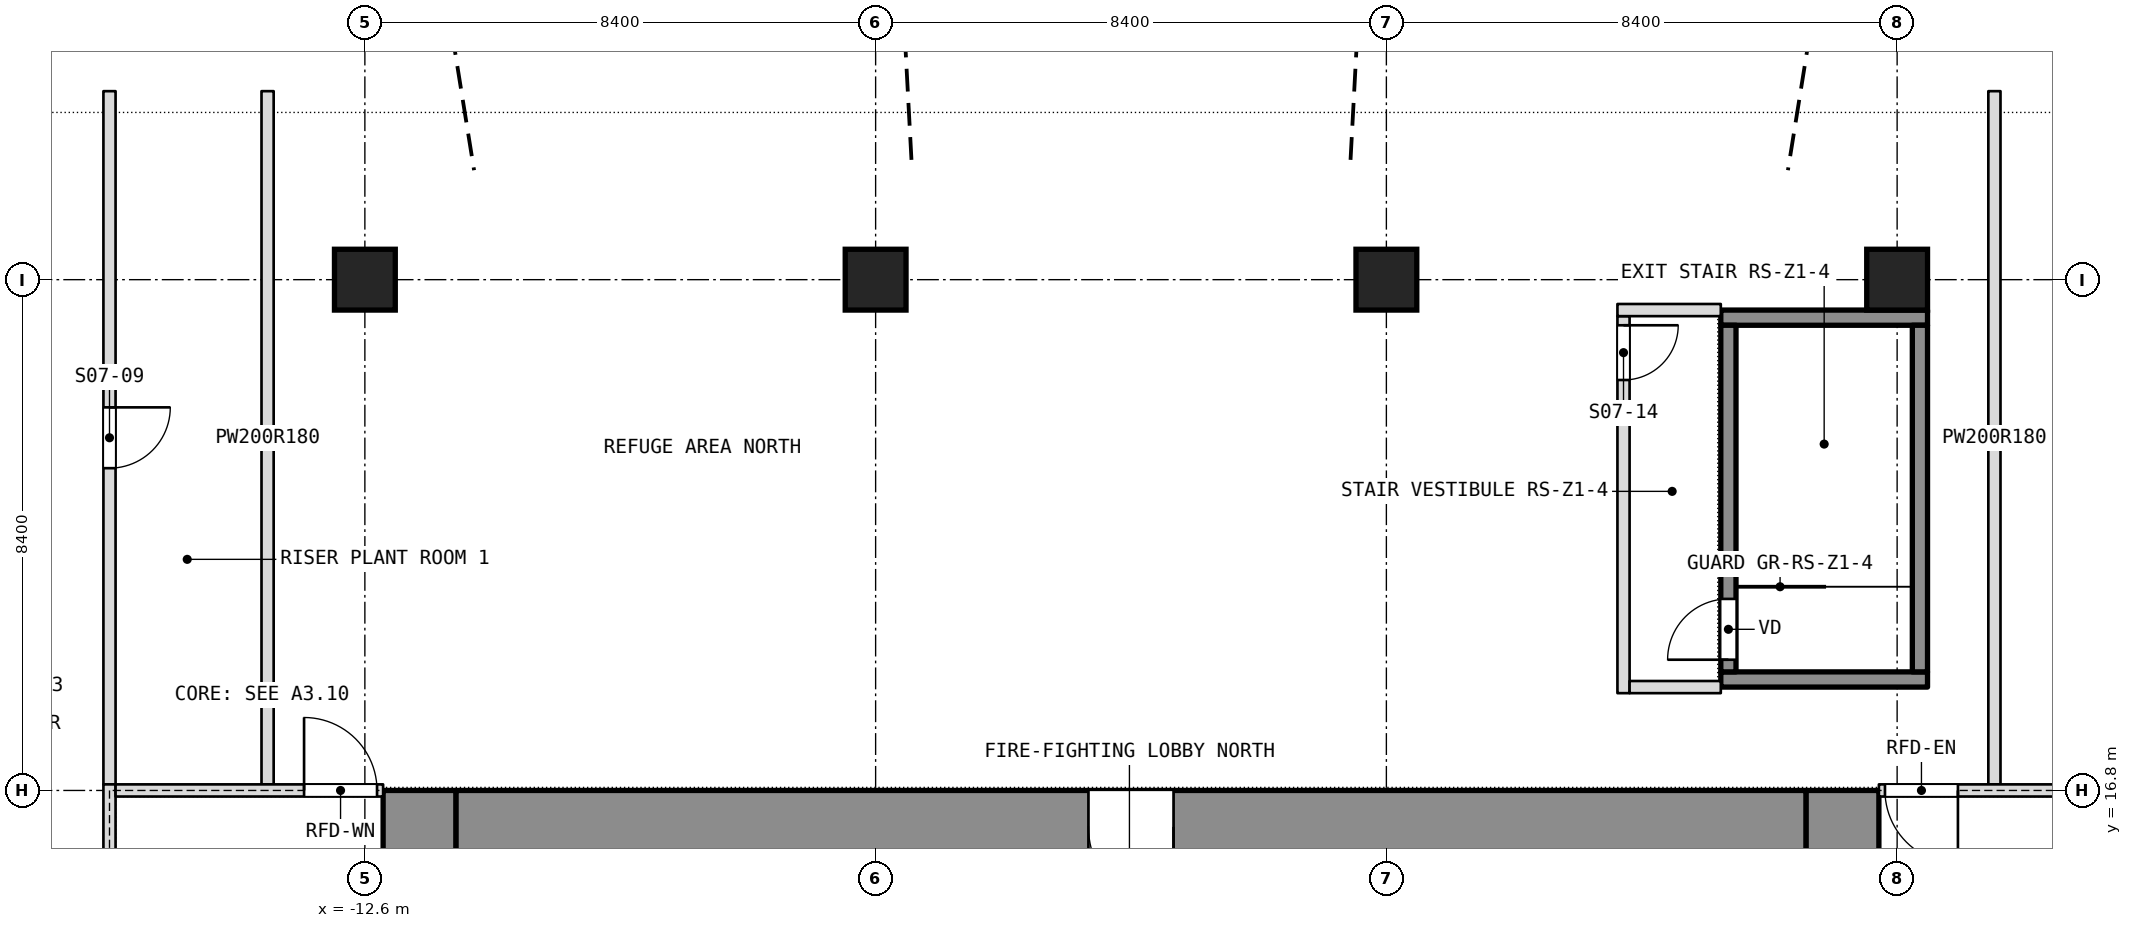
"""IFC4 building model, lengths in metres.
Left out: names, types, materials, properties, quantities, classifications, styles, units other than length and angle.
Written with IfcOpenShell. Run it as: python <this file> out.ifc"""

import sys

from ifc_helpers import new_model, si_unit, direction, frame, frame_2d, origin, origin_2d, place, context, subcontext, project, spatial, rectangle, extrude, element, fill, save


model = new_model("IFC4")
c1 = context("Model", 3, precision=1e-05, world=origin(), true_north=direction((0.0, 1.0)))
c2 = subcontext(c1, "Body", "Model", "MODEL_VIEW")
j1 = project(units=[si_unit("LENGTHUNIT", "METRE"), si_unit("PLANEANGLEUNIT", "RADIAN")], contexts=[c1])
p1 = place(None, origin())
s1 = spatial("IfcSite", under=j1, at=p1, CompositionType="ELEMENT")
p2 = place(p1, origin())
s2 = spatial("IfcBuilding", under=s1, at=p2, CompositionType="ELEMENT")
p3 = place(p2, frame((0.0, 0.0, 86.9)))
s3 = spatial("IfcBuildingStorey", under=s2, at=p3, CompositionType="ELEMENT", Elevation=86.9)
p4 = place(p3, frame((11.7, 0.0, 0.0), z_axis=(0.0, 0.0, 1.0), x_axis=(0.0, 1.0, 0.0)))
e1 = element("IfcWall", 1, at=p4, inside=s3, PredefinedType="SHEAR", context=c2, shape_type="SweptSolid", body=[
    extrude(rectangle(XDim=16.8, YDim=1.2, at=frame_2d((8.4, 0.0))), origin(), (0.0, 0.0, 1.0), 10.8),
])
p5 = place(p4, frame((6.825, 0.0, 0.0)))
e2 = element("IfcOpeningElement", 2, at=p5, cuts=e1, PredefinedType="OPENING", context=c2, shape_type="SweptSolid", body=[
    extrude(rectangle(XDim=1.2, YDim=2.1, at=frame_2d((0.6, 1.05))), frame((0.0, 0.6, 0.0), z_axis=(0.0, -1.0, 0.0), x_axis=(1.0, 0.0, 0.0)), (0.0, 0.0, 1.0), 1.2),
])
p6 = place(p4, frame((8.775, 0.0, 0.0)))
e3 = element("IfcOpeningElement", 3, at=p6, cuts=e1, PredefinedType="OPENING", context=c2, shape_type="SweptSolid", body=[
    extrude(rectangle(XDim=1.2, YDim=2.1, at=frame_2d((0.6, 1.05))), frame((0.0, 0.6, 0.0), z_axis=(0.0, -1.0, 0.0), x_axis=(1.0, 0.0, 0.0)), (0.0, 0.0, 1.0), 1.2),
])
p7 = place(p3, frame((-11.7, 0.0, 0.0), z_axis=(0.0, 0.0, 1.0), x_axis=(0.0, 1.0, 0.0)))
e4 = element("IfcWall", 4, at=p7, inside=s3, PredefinedType="SHEAR", context=c2, shape_type="SweptSolid", body=[
    extrude(rectangle(XDim=16.8, YDim=1.2, at=frame_2d((8.4, 0.0))), origin(), (0.0, 0.0, 1.0), 10.8),
])
p8 = place(p7, frame((6.825, 0.0, 0.0)))
e5 = element("IfcOpeningElement", 5, at=p8, cuts=e4, PredefinedType="OPENING", context=c2, shape_type="SweptSolid", body=[
    extrude(rectangle(XDim=1.2, YDim=2.1, at=frame_2d((0.6, 1.05))), frame((0.0, 0.6, 0.0), z_axis=(0.0, -1.0, 0.0), x_axis=(1.0, 0.0, 0.0)), (0.0, 0.0, 1.0), 1.2),
])
p9 = place(p7, frame((8.775, 0.0, 0.0)))
e6 = element("IfcOpeningElement", 6, at=p9, cuts=e4, PredefinedType="OPENING", context=c2, shape_type="SweptSolid", body=[
    extrude(rectangle(XDim=1.2, YDim=2.1, at=frame_2d((0.6, 1.05))), frame((0.0, 0.6, 0.0), z_axis=(0.0, -1.0, 0.0), x_axis=(1.0, 0.0, 0.0)), (0.0, 0.0, 1.0), 1.2),
])
p10 = place(p3, frame((-11.1, 16.2, 0.0), z_axis=(0.0, 0.0, 1.0), x_axis=(1.0, 0.0, 0.0)))
e7 = element("IfcWall", 7, at=p10, inside=s3, PredefinedType="SHEAR", context=c2, shape_type="SweptSolid", body=[
    extrude(rectangle(XDim=22.2, YDim=1.2, at=frame_2d((11.1, 0.0))), origin(), (0.0, 0.0, 1.0), 10.8),
])
p11 = place(p10, frame((10.4, 0.0, 0.0)))
e8 = element("IfcOpeningElement", 8, at=p11, cuts=e7, PredefinedType="OPENING", context=c2, shape_type="SweptSolid", body=[
    extrude(rectangle(XDim=1.4, YDim=2.1, at=frame_2d((0.7, 1.05))), frame((0.0, 0.6, 0.0), z_axis=(0.0, -1.0, 0.0), x_axis=(1.0, 0.0, 0.0)), (0.0, 0.0, 1.0), 1.2),
])
for number, where, z_axis, x_axis in (
    (9, (-12.6, 25.2, 0.0), (0.0, 0.0, 1.0), (1.0, 0.0, 0.0)),
    (10, (-4.2, 25.2, 0.0), (0.0, 0.0, 1.0), (1.0, 0.0, 0.0)),
    (11, (4.2, 25.2, 0.0), (0.0, 0.0, 1.0), (1.0, 0.0, 0.0)),
    (12, (12.6, 25.2, 0.0), (0.0, 0.0, 1.0), (1.0, 0.0, 0.0)),
):
    element("IfcColumn", number, at=place(p3, frame(where, z_axis=z_axis, x_axis=x_axis)), inside=s3, PredefinedType="COLUMN", context=c2, shape_type="SweptSolid", body=[
        extrude(rectangle(XDim=1.0, YDim=1.0, at=origin_2d()), origin(), (0.0, 0.0, 1.0), 10.54),
    ])
p12 = place(p3, frame((14.2, 16.9, 0.0), z_axis=(0.0, 0.0, 1.0), x_axis=(0.0, 1.0, 0.0)))
e13 = element("IfcWall", 13, at=p12, inside=s3, PredefinedType="PARTITIONING", context=c2, shape_type="SweptSolid", body=[
    extrude(rectangle(XDim=11.4, YDim=0.2, at=frame_2d((5.7, 0.0))), origin(), (0.0, 0.0, 1.0), 10.54),
])
p13 = place(p3, frame((8.1, 18.4, 0.0), z_axis=(0.0, 0.0, 1.0), x_axis=(0.0, 1.0, 0.0)))
e14 = element("IfcWall", 14, at=p13, inside=s3, PredefinedType="PARTITIONING", context=c2, shape_type="SweptSolid", body=[
    extrude(rectangle(XDim=6.2, YDim=0.2, at=frame_2d((3.1, 0.0))), origin(), (0.0, 0.0, 1.0), 10.54),
])
p14 = place(p13, frame((5.15, 0.0, 0.0)))
e15 = element("IfcOpeningElement", 15, at=p14, cuts=e14, PredefinedType="OPENING", context=c2, shape_type="SweptSolid", body=[
    extrude(rectangle(XDim=0.9, YDim=2.1, at=frame_2d((0.45, 1.05))), frame((0.0, 0.1, 0.0), z_axis=(0.0, -1.0, 0.0), x_axis=(1.0, 0.0, 0.0)), (0.0, 0.0, 1.0), 0.2),
])
p15 = place(p3, frame((-14.2, 16.9, 0.0), z_axis=(0.0, 0.0, 1.0), x_axis=(0.0, 1.0, 0.0)))
e16 = element("IfcWall", 16, at=p15, inside=s3, PredefinedType="PARTITIONING", context=c2, shape_type="SweptSolid", body=[
    extrude(rectangle(XDim=11.4, YDim=0.2, at=frame_2d((5.7, 0.0))), origin(), (0.0, 0.0, 1.0), 10.54),
])
p16 = place(p3, frame((-16.8, 16.9, 0.0), z_axis=(0.0, 0.0, 1.0), x_axis=(0.0, 1.0, 0.0)))
e17 = element("IfcWall", 17, at=p16, inside=s3, PredefinedType="PARTITIONING", context=c2, shape_type="SweptSolid", body=[
    extrude(rectangle(XDim=11.4, YDim=0.2, at=frame_2d((5.7, 0.0))), origin(), (0.0, 0.0, 1.0), 10.14),
])
p17 = place(p16, frame((5.2, 0.0, 0.0)))
e18 = element("IfcOpeningElement", 18, at=p17, cuts=e17, PredefinedType="OPENING", context=c2, shape_type="SweptSolid", body=[
    extrude(rectangle(XDim=1.0, YDim=2.1, at=frame_2d((0.5, 1.05))), frame((0.0, 0.1, 0.0), z_axis=(0.0, -1.0, 0.0), x_axis=(1.0, 0.0, 0.0)), (0.0, 0.0, 1.0), 0.2),
])
p18 = place(p3, frame((8.2, 18.5, 0.0), z_axis=(0.0, 0.0, 1.0), x_axis=(1.0, 0.0, 0.0)))
e19 = element("IfcWall", 19, at=p18, inside=s3, PredefinedType="PARTITIONING", context=c2, shape_type="SweptSolid", body=[
    extrude(rectangle(XDim=1.5, YDim=0.2, at=frame_2d((0.75, 0.0))), origin(), (0.0, 0.0, 1.0), 10.54),
])
p19 = place(p3, frame((8.0, 24.7, 0.0), z_axis=(0.0, 0.0, 1.0), x_axis=(1.0, 0.0, 0.0)))
e20 = element("IfcWall", 20, at=p19, inside=s3, PredefinedType="PARTITIONING", context=c2, shape_type="SweptSolid", body=[
    extrude(rectangle(XDim=1.7, YDim=0.2, at=frame_2d((0.85, 0.0))), origin(), (0.0, 0.0, 1.0), 10.54),
])
p20 = place(p3, frame((-16.8, -0.1, 0.0), z_axis=(0.0, 0.0, 1.0), x_axis=(0.0, 1.0, 0.0)))
e21 = element("IfcWall", 21, at=p20, inside=s3, PredefinedType="PARTITIONING", context=c2, shape_type="SweptSolid", body=[
    extrude(rectangle(XDim=17.0, YDim=0.2, at=frame_2d((8.5, 0.0))), origin(), (0.0, 0.0, 1.0), 10.54),
])
p21 = place(p20, frame((2.2, 0.0, 0.0)))
e22 = element("IfcOpeningElement", 22, at=p21, cuts=e21, PredefinedType="OPENING", context=c2, shape_type="SweptSolid", body=[
    extrude(rectangle(XDim=1.8, YDim=2.1, at=frame_2d((0.9, 1.05))), frame((0.0, 0.1, 0.0), z_axis=(0.0, -1.0, 0.0), x_axis=(1.0, 0.0, 0.0)), (0.0, 0.0, 1.0), 0.2),
])
p22 = place(p20, frame((7.2, 0.0, 0.0)))
e23 = element("IfcOpeningElement", 23, at=p22, cuts=e21, PredefinedType="OPENING", context=c2, shape_type="SweptSolid", body=[
    extrude(rectangle(XDim=1.8, YDim=2.1, at=frame_2d((0.9, 1.05))), frame((0.0, 0.1, 0.0), z_axis=(0.0, -1.0, 0.0), x_axis=(1.0, 0.0, 0.0)), (0.0, 0.0, 1.0), 0.2),
])
p23 = place(p3, frame((-16.7, 16.8, 0.0), z_axis=(0.0, 0.0, 1.0), x_axis=(1.0, 0.0, 0.0)))
e24 = element("IfcWall", 24, at=p23, inside=s3, PredefinedType="PARTITIONING", context=c2, shape_type="SweptSolid", body=[
    extrude(rectangle(XDim=4.4, YDim=0.2, at=frame_2d((2.2, 0.0))), origin(), (0.0, 0.0, 1.0), 10.09),
])
p24 = place(p23, frame((3.1, 0.0, 0.0)))
e25 = element("IfcOpeningElement", 25, at=p24, cuts=e24, PredefinedType="OPENING", context=c2, shape_type="SweptSolid", body=[
    extrude(rectangle(XDim=1.2, YDim=2.1, at=frame_2d((0.6, 1.05))), frame((0.0, 0.1, 0.0), z_axis=(0.0, -1.0, 0.0), x_axis=(1.0, 0.0, 0.0)), (0.0, 0.0, 1.0), 0.2),
])
p25 = place(p3, frame((12.3, 16.8, 0.0), z_axis=(0.0, 0.0, 1.0), x_axis=(1.0, 0.0, 0.0)))
e26 = element("IfcWall", 26, at=p25, inside=s3, PredefinedType="PARTITIONING", context=c2, shape_type="SweptSolid", body=[
    extrude(rectangle(XDim=4.4, YDim=0.2, at=frame_2d((2.2, 0.0))), origin(), (0.0, 0.0, 1.0), 10.09),
])
p26 = place(p25, frame((0.1, 0.0, 0.0)))
e27 = element("IfcOpeningElement", 27, at=p26, cuts=e26, PredefinedType="OPENING", context=c2, shape_type="SweptSolid", body=[
    extrude(rectangle(XDim=1.2, YDim=2.1, at=frame_2d((0.6, 1.05))), frame((0.0, 0.1, 0.0), z_axis=(0.0, -1.0, 0.0), x_axis=(1.0, 0.0, 0.0)), (0.0, 0.0, 1.0), 0.2),
])
for number, where, z_axis, x_axis in (
    (28, (9.7, 18.625, 0.1), (0.0, 0.0, 1.0), (1.0, 0.0, 0.0)),
    (29, (9.7, 24.575, 0.1), (0.0, 0.0, 1.0), (1.0, 0.0, 0.0)),
):
    element("IfcWall", number, at=place(p3, frame(where, z_axis=z_axis, x_axis=x_axis)), inside=s3, PredefinedType="SHEAR", context=c2, shape_type="SweptSolid", body=[
        extrude(rectangle(XDim=3.4, YDim=0.25, at=frame_2d((1.7, 0.0))), origin(), (0.0, 0.0, 1.0), 10.44),
    ])
p27 = place(p3, frame((9.825, 18.75, 0.1), z_axis=(0.0, 0.0, 1.0), x_axis=(0.0, 1.0, 0.0)))
e30 = element("IfcWall", 30, at=p27, inside=s3, PredefinedType="SHEAR", context=c2, shape_type="SweptSolid", body=[
    extrude(rectangle(XDim=5.7, YDim=0.25, at=frame_2d((2.85, 0.0))), origin(), (0.0, 0.0, 1.0), 10.44),
])
p28 = place(p27, frame((0.2, 0.0, 0.0)))
e31 = element("IfcOpeningElement", 31, at=p28, cuts=e30, PredefinedType="OPENING", context=c2, shape_type="SweptSolid", body=[
    extrude(rectangle(XDim=1.0, YDim=2.1, at=frame_2d((0.5, 1.05))), frame((0.0, 0.125, 0.0), z_axis=(0.0, -1.0, 0.0), x_axis=(1.0, 0.0, 0.0)), (0.0, 0.0, 1.0), 0.25),
])
p29 = place(p3, frame((12.975, 18.75, 0.1), z_axis=(0.0, 0.0, 1.0), x_axis=(0.0, 1.0, 0.0)))
e32 = element("IfcWall", 32, at=p29, inside=s3, PredefinedType="SHEAR", context=c2, shape_type="SweptSolid", body=[
    extrude(rectangle(XDim=5.7, YDim=0.25, at=frame_2d((2.85, 0.0))), origin(), (0.0, 0.0, 1.0), 10.44),
])
p30 = place(p17, origin())
e33 = element("IfcDoor", 33, at=p30, inside=s3, OperationType="SINGLE_SWING_RIGHT", PredefinedType="DOOR", context=c2, shape_type="SweptSolid", body=[
    extrude(rectangle(XDim=1.0, YDim=2.1, at=frame_2d((0.5, 1.05))), frame((0.0, 0.025, 0.0), z_axis=(0.0, -1.0, 0.0), x_axis=(1.0, 0.0, 0.0)), (0.0, 0.0, 1.0), 0.05),
])
fill(e18, e33)
p31 = place(p14, origin())
e34 = element("IfcDoor", 34, at=p31, inside=s3, OperationType="SINGLE_SWING_LEFT", PredefinedType="DOOR", context=c2, shape_type="SweptSolid", body=[
    extrude(rectangle(XDim=0.9, YDim=2.1, at=frame_2d((0.45, 1.05))), frame((0.0, 0.025, 0.0), z_axis=(0.0, -1.0, 0.0), x_axis=(1.0, 0.0, 0.0)), (0.0, 0.0, 1.0), 0.05),
])
fill(e15, e34)
p32 = place(p28, origin())
e35 = element("IfcDoor", 35, at=p32, inside=s3, OperationType="SINGLE_SWING_LEFT", PredefinedType="DOOR", context=c2, shape_type="SweptSolid", body=[
    extrude(rectangle(XDim=1.0, YDim=2.1, at=frame_2d((0.5, 1.05))), frame((0.0, 0.025, 0.0), z_axis=(0.0, -1.0, 0.0), x_axis=(1.0, 0.0, 0.0)), (0.0, 0.0, 1.0), 0.05),
])
fill(e31, e35)
p33 = place(p11, origin())
e36 = element("IfcDoor", 36, at=p33, inside=s3, OperationType="SINGLE_SWING_LEFT", PredefinedType="DOOR", context=c2, shape_type="SweptSolid", body=[
    extrude(rectangle(XDim=1.4, YDim=2.1, at=frame_2d((0.7, 1.05))), frame((0.0, 0.025, 0.0), z_axis=(0.0, -1.0, 0.0), x_axis=(1.0, 0.0, 0.0)), (0.0, 0.0, 1.0), 0.05),
])
fill(e8, e36)
p34 = place(p24, origin())
e37 = element("IfcDoor", 37, at=p34, inside=s3, OperationType="SINGLE_SWING_LEFT", PredefinedType="DOOR", context=c2, shape_type="SweptSolid", body=[
    extrude(rectangle(XDim=1.2, YDim=2.1, at=frame_2d((0.6, 1.05))), frame((0.0, 0.025, 0.0), z_axis=(0.0, -1.0, 0.0), x_axis=(1.0, 0.0, 0.0)), (0.0, 0.0, 1.0), 0.05),
])
fill(e25, e37)
p35 = place(p26, origin())
e38 = element("IfcDoor", 38, at=p35, inside=s3, OperationType="SINGLE_SWING_LEFT", PredefinedType="DOOR", context=c2, shape_type="SweptSolid", body=[
    extrude(rectangle(XDim=1.2, YDim=2.1, at=frame_2d((0.6, 1.05))), frame((0.0, 0.025, 0.0), z_axis=(0.0, -1.0, 0.0), x_axis=(1.0, 0.0, 0.0)), (0.0, 0.0, 1.0), 0.05),
])
fill(e27, e38)
save(model, sys.argv[1])
